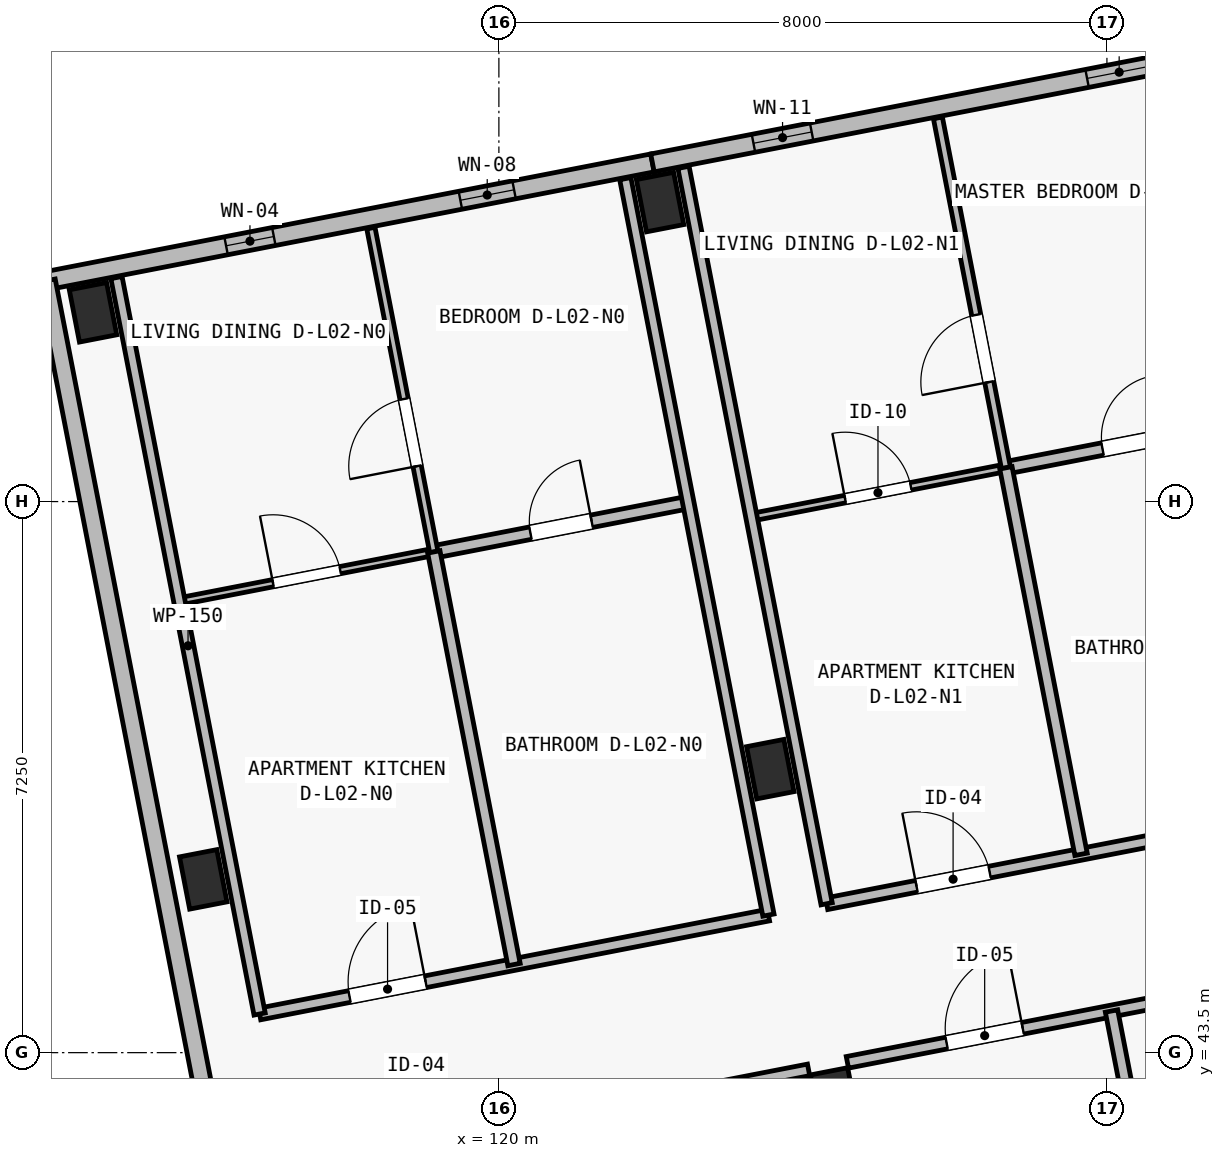
"""IFC4 building model, lengths in metres.
Left out: names, types, materials, properties, quantities, classifications, styles, units other than length and angle.
Written with IfcOpenShell. Run it as: python <this file> out.ifc"""

import sys

from ifc_helpers import new_model, si_unit, direction, frame, frame_2d, origin, origin_2d, place, context, subcontext, project, spatial, rectangle, extrude, element, fill, save


model = new_model("IFC4")
c1 = context("Model", 3, precision=1e-05, world=origin(), true_north=direction((0.0, 1.0)))
c2 = subcontext(c1, "Body", "Model", "MODEL_VIEW")
j1 = project(units=[si_unit("LENGTHUNIT", "METRE"), si_unit("PLANEANGLEUNIT", "RADIAN")], contexts=[c1])
p1 = place(None, origin())
s1 = spatial("IfcSite", under=j1, at=p1, CompositionType="ELEMENT")
p2 = place(p1, origin())
s2 = spatial("IfcBuilding", under=s1, at=p2, CompositionType="ELEMENT")
p3 = place(p2, frame((0.0, 0.0, 8.4)))
s3 = spatial("IfcBuildingStorey", under=s2, at=p3, CompositionType="ELEMENT", Elevation=8.4)
for number, where, z_axis, x_axis in (
    (1, (116.11, 45.78, 0.0), (0.0, 0.0, 1.0), (0.982, 0.191, 0.0)),
    (2, (114.66, 53.24, 0.0), (0.0, 0.0, 1.0), (0.982, 0.191, 0.0)),
    (3, (124.41, 42.91, 0.0), (0.0, 0.0, 1.0), (0.982, 0.191, 0.0)),
    (4, (123.571, 47.23, 0.0), (0.0, 0.0, 1.0), (0.982, 0.191, 0.0)),
    (5, (122.121, 54.69, 0.0), (0.0, 0.0, 1.0), (0.982, 0.191, 0.0)),
):
    element("IfcColumn", number, at=place(p3, frame(where, z_axis=z_axis, x_axis=x_axis)), inside=s3, PredefinedType="COLUMN", context=c2, shape_type="SweptSolid", body=[
        extrude(rectangle(XDim=0.5, YDim=0.7, at=origin_2d()), origin(), (0.0, 0.0, 1.0), 3.25),
    ])
p4 = place(p3, frame((114.045, 53.655, 0.0), z_axis=(0.0, 0.0, 1.0), x_axis=(0.981627273155, 0.190808533872, 0.0)))
e6 = element("IfcWall", 6, at=p4, inside=s3, PredefinedType="SOLIDWALL", context=c2, shape_type="SweptSolid", body=[
    extrude(rectangle(XDim=8.125, YDim=0.24, at=frame_2d((4.062, 0.0))), origin(), (0.0, 0.0, 1.0), 3.0),
])
p5 = place(p4, frame((2.41, 0.0, 0.44)))
e7 = element("IfcOpeningElement", 7, at=p5, cuts=e6, PredefinedType="OPENING", context=c2, shape_type="SweptSolid", body=[
    extrude(rectangle(XDim=0.64, YDim=2.18, at=frame_2d((0.32, 1.09))), frame((0.0, 0.135, 0.0), z_axis=(0.0, -1.0, 0.0), x_axis=(1.0, 0.0, 0.0)), (0.0, 0.0, 1.0), 0.27),
])
p6 = place(p4, frame((5.551, 0.0, 0.5)))
e8 = element("IfcOpeningElement", 8, at=p6, cuts=e6, PredefinedType="OPENING", context=c2, shape_type="SweptSolid", body=[
    extrude(rectangle(XDim=0.72, YDim=2.16, at=frame_2d((0.36, 1.08))), frame((0.0, 0.135, 0.0), z_axis=(0.0, -1.0, 0.0), x_axis=(1.0, 0.0, 0.0)), (0.0, 0.0, 1.0), 0.27),
])
p7 = place(p3, frame((122.02, 55.205, 0.0), z_axis=(0.0, 0.0, 1.0), x_axis=(0.981626422232, 0.190812911449, 0.0)))
e9 = element("IfcWall", 9, at=p7, inside=s3, PredefinedType="SOLIDWALL", context=c2, shape_type="SweptSolid", body=[
    extrude(rectangle(XDim=7.6, YDim=0.24, at=frame_2d((3.8, 0.0))), origin(), (0.0, 0.0, 1.0), 3.0),
])
p8 = place(p7, frame((1.354, 0.0, 0.5)))
e10 = element("IfcOpeningElement", 10, at=p8, cuts=e9, PredefinedType="OPENING", context=c2, shape_type="SweptSolid", body=[
    extrude(rectangle(XDim=0.78, YDim=2.2, at=frame_2d((0.39, 1.1))), frame((0.0, 0.135, 0.0), z_axis=(0.0, -1.0, 0.0), x_axis=(1.0, 0.0, 0.0)), (0.0, 0.0, 1.0), 0.27),
])
p9 = place(p7, frame((5.826, 0.0, 0.44)))
e11 = element("IfcOpeningElement", 11, at=p9, cuts=e9, PredefinedType="OPENING", context=c2, shape_type="SweptSolid", body=[
    extrude(rectangle(XDim=0.86, YDim=2.36, at=frame_2d((0.43, 1.18))), frame((0.0, 0.135, 0.0), z_axis=(0.0, -1.0, 0.0), x_axis=(1.0, 0.0, 0.0)), (0.0, 0.0, 1.0), 0.27),
])
p10 = place(p3, frame((117.985, 33.385, 0.0), z_axis=(0.0, 0.0, 1.0), x_axis=(-0.190808900739, 0.981627201843, 0.0)))
e12 = element("IfcWall", 12, at=p10, inside=s3, PredefinedType="SOLIDWALL", context=c2, shape_type="SweptSolid", body=[
    extrude(rectangle(XDim=20.65, YDim=0.24, at=frame_2d((10.325, 0.0))), origin(), (0.0, 0.0, 1.0), 3.0),
])
p11 = place(p10, frame((2.81, 0.0, 0.45)))
e13 = element("IfcOpeningElement", 13, at=p11, cuts=e12, PredefinedType="OPENING", context=c2, shape_type="SweptSolid", body=[
    extrude(rectangle(XDim=0.62, YDim=2.28, at=frame_2d((0.31, 1.14))), frame((0.0, 0.135, 0.0), z_axis=(0.0, -1.0, 0.0), x_axis=(1.0, 0.0, 0.0)), (0.0, 0.0, 1.0), 0.27),
])
p12 = place(p3, frame((116.482, 41.797, 0.0), z_axis=(0.0, 0.0, 1.0), x_axis=(0.981629678105, 0.190796161028, 0.0)))
e14 = element("IfcWall", 14, at=p12, inside=s3, PredefinedType="PARTITIONING", context=c2, shape_type="SweptSolid", body=[
    extrude(rectangle(XDim=7.735, YDim=0.155, at=frame_2d((3.868, 0.0))), origin(), (0.0, 0.0, 1.0), 2.97),
])
p13 = place(p12, frame((1.985, 0.0, 0.0)))
e15 = element("IfcOpeningElement", 15, at=p13, cuts=e14, PredefinedType="OPENING", context=c2, shape_type="SweptSolid", body=[
    extrude(rectangle(XDim=0.98, YDim=2.15, at=frame_2d((0.49, 1.075))), frame((0.0, 0.093, 0.0), z_axis=(0.0, -1.0, 0.0), x_axis=(1.0, 0.0, 0.0)), (0.0, 0.0, 1.0), 0.185),
])
p14 = place(p3, frame((124.585, 43.372, 0.0), z_axis=(0.0, 0.0, 1.0), x_axis=(0.9816234647, 0.190828125677, 0.0)))
e16 = element("IfcWall", 16, at=p14, inside=s3, PredefinedType="PARTITIONING", context=c2, shape_type="SweptSolid", body=[
    extrude(rectangle(XDim=7.08, YDim=0.155, at=frame_2d((3.54, 0.0))), origin(), (0.0, 0.0, 1.0), 2.97),
])
p15 = place(p14, frame((1.33, 0.0, 0.0)))
e17 = element("IfcOpeningElement", 17, at=p15, cuts=e16, PredefinedType="OPENING", context=c2, shape_type="SweptSolid", body=[
    extrude(rectangle(XDim=1.02, YDim=2.2, at=frame_2d((0.51, 1.1))), frame((0.0, 0.093, 0.0), z_axis=(0.0, -1.0, 0.0), x_axis=(1.0, 0.0, 0.0)), (0.0, 0.0, 1.0), 0.185),
])
p16 = place(p3, frame((128.741, 40.543, 0.0), z_axis=(0.0, 0.0, 1.0), x_axis=(-0.190800102044, 0.981628912095, 0.0)))
e18 = element("IfcWall", 18, at=p16, inside=s3, PredefinedType="PLUMBINGWALL", context=c2, shape_type="SweptSolid", body=[
    extrude(rectangle(XDim=3.57, YDim=0.165, at=frame_2d((1.785, 0.0))), origin(), (0.0, 0.0, 1.0), 2.97),
])
p17 = place(p3, frame((116.852, 44.009, 0.0), z_axis=(0.0, 0.0, 1.0), x_axis=(0.981629173664, 0.190798756314, 0.0)))
e19 = element("IfcWall", 19, at=p17, inside=s3, PredefinedType="PARTITIONING", context=c2, shape_type="SweptSolid", body=[
    extrude(rectangle(XDim=6.82, YDim=0.155, at=frame_2d((3.41, 0.0))), origin(), (0.0, 0.0, 1.0), 2.97),
])
p18 = place(p17, frame((1.205, 0.0, 0.0)))
e20 = element("IfcOpeningElement", 20, at=p18, cuts=e19, PredefinedType="OPENING", context=c2, shape_type="SweptSolid", body=[
    extrude(rectangle(XDim=1.02, YDim=2.2, at=frame_2d((0.51, 1.1))), frame((0.0, 0.093, 0.0), z_axis=(0.0, -1.0, 0.0), x_axis=(1.0, 0.0, 0.0)), (0.0, 0.0, 1.0), 0.185),
])
p19 = place(p3, frame((115.797, 49.437, 0.0), z_axis=(0.0, 0.0, 1.0), x_axis=(0.981615762271, 0.19086774285, 0.0)))
e21 = element("IfcWall", 21, at=p19, inside=s3, PredefinedType="PARTITIONING", context=c2, shape_type="SweptSolid", body=[
    extrude(rectangle(XDim=3.41, YDim=0.095, at=frame_2d((1.705, 0.0))), origin(), (0.0, 0.0, 1.0), 2.97),
])
p20 = place(p19, frame((1.255, 0.0, 0.0)))
e22 = element("IfcOpeningElement", 22, at=p20, cuts=e21, PredefinedType="OPENING", context=c2, shape_type="SweptSolid", body=[
    extrude(rectangle(XDim=0.9, YDim=2.1, at=frame_2d((0.45, 1.05))), frame((0.0, 0.062, 0.0), z_axis=(0.0, -1.0, 0.0), x_axis=(1.0, 0.0, 0.0)), (0.0, 0.0, 1.0), 0.125),
])
p21 = place(p3, frame((119.144, 50.088, 0.0), z_axis=(0.0, 0.0, 1.0), x_axis=(0.981629173664, 0.190798756314, 0.0)))
e23 = element("IfcWall", 23, at=p21, inside=s3, PredefinedType="PLUMBINGWALL", context=c2, shape_type="SweptSolid", body=[
    extrude(rectangle(XDim=3.41, YDim=0.165, at=frame_2d((1.705, 0.0))), origin(), (0.0, 0.0, 1.0), 2.97),
])
p22 = place(p21, frame((1.295, 0.0, 0.0)))
e24 = element("IfcOpeningElement", 24, at=p22, cuts=e23, PredefinedType="OPENING", context=c2, shape_type="SweptSolid", body=[
    extrude(rectangle(XDim=0.82, YDim=2.08, at=frame_2d((0.41, 1.04))), frame((0.0, 0.097, 0.0), z_axis=(0.0, -1.0, 0.0), x_axis=(1.0, 0.0, 0.0)), (0.0, 0.0, 1.0), 0.195),
])
p23 = place(p3, frame((119.144, 50.088, 0.0), z_axis=(0.0, 0.0, 1.0), x_axis=(-0.190812443151, 0.981626513262, 0.0)))
e25 = element("IfcWall", 25, at=p23, inside=s3, PredefinedType="PARTITIONING", context=c2, shape_type="SweptSolid", body=[
    extrude(rectangle(XDim=4.34, YDim=0.11, at=frame_2d((2.17, 0.0))), origin(), (0.0, 0.0, 1.0), 2.97),
])
p24 = place(p23, frame((1.15, 0.0, 0.0)))
e26 = element("IfcOpeningElement", 26, at=p24, cuts=e25, PredefinedType="OPENING", context=c2, shape_type="SweptSolid", body=[
    extrude(rectangle(XDim=0.9, YDim=2.1, at=frame_2d((0.45, 1.05))), frame((0.0, 0.07, 0.0), z_axis=(0.0, -1.0, 0.0), x_axis=(1.0, 0.0, 0.0)), (0.0, 0.0, 1.0), 0.14),
])
p25 = place(p3, frame((120.199, 44.659, 0.0), z_axis=(0.0, 0.0, 1.0), x_axis=(-0.190807031124, 0.981627565258, 0.0)))
e27 = element("IfcWall", 27, at=p25, inside=s3, PredefinedType="PLUMBINGWALL", context=c2, shape_type="SweptSolid", body=[
    extrude(rectangle(XDim=5.53, YDim=0.165, at=frame_2d((2.765, 0.0))), origin(), (0.0, 0.0, 1.0), 2.97),
])
p26 = place(p3, frame((116.852, 44.009, 0.0), z_axis=(0.0, 0.0, 1.0), x_axis=(-0.190814044018, 0.981626202078, 0.0)))
e28 = element("IfcWall", 28, at=p26, inside=s3, PredefinedType="PARTITIONING", context=c2, shape_type="SweptSolid", body=[
    extrude(rectangle(XDim=9.87, YDim=0.15, at=frame_2d((4.935, 0.0))), origin(), (0.0, 0.0, 1.0), 2.97),
])
p27 = place(p3, frame((123.547, 45.31, 0.0), z_axis=(0.0, 0.0, 1.0), x_axis=(-0.190809410863, 0.981627102685, 0.0)))
e29 = element("IfcWall", 29, at=p27, inside=s3, PredefinedType="PARTITIONING", context=c2, shape_type="SweptSolid", body=[
    extrude(rectangle(XDim=9.87, YDim=0.15, at=frame_2d((4.935, 0.0))), origin(), (0.0, 0.0, 1.0), 2.97),
])
p28 = place(p3, frame((124.312, 45.459, 0.0), z_axis=(0.0, 0.0, 1.0), x_axis=(0.981627870431, 0.190805461121, 0.0)))
e30 = element("IfcWall", 30, at=p28, inside=s3, PredefinedType="PARTITIONING", context=c2, shape_type="SweptSolid", body=[
    extrude(rectangle(XDim=6.82, YDim=0.155, at=frame_2d((3.41, 0.0))), origin(), (0.0, 0.0, 1.0), 2.97),
])
p29 = place(p28, frame((1.205, 0.0, 0.0)))
e31 = element("IfcOpeningElement", 31, at=p29, cuts=e30, PredefinedType="OPENING", context=c2, shape_type="SweptSolid", body=[
    extrude(rectangle(XDim=0.98, YDim=2.15, at=frame_2d((0.49, 1.075))), frame((0.0, 0.093, 0.0), z_axis=(0.0, -1.0, 0.0), x_axis=(1.0, 0.0, 0.0)), (0.0, 0.0, 1.0), 0.185),
])
p30 = place(p3, frame((123.324, 50.543, 0.0), z_axis=(0.0, 0.0, 1.0), x_axis=(0.981629173664, 0.190798756314, 0.0)))
e32 = element("IfcWall", 32, at=p30, inside=s3, PredefinedType="PARTITIONING", context=c2, shape_type="SweptSolid", body=[
    extrude(rectangle(XDim=3.41, YDim=0.1, at=frame_2d((1.705, 0.0))), origin(), (0.0, 0.0, 1.0), 2.97),
])
p31 = place(p30, frame((1.255, 0.0, 0.0)))
e33 = element("IfcOpeningElement", 33, at=p31, cuts=e32, PredefinedType="OPENING", context=c2, shape_type="SweptSolid", body=[
    extrude(rectangle(XDim=0.88, YDim=2.1, at=frame_2d((0.44, 1.05))), frame((0.0, 0.065, 0.0), z_axis=(0.0, -1.0, 0.0), x_axis=(1.0, 0.0, 0.0)), (0.0, 0.0, 1.0), 0.13),
])
p32 = place(p3, frame((126.671, 51.194, 0.0), z_axis=(0.0, 0.0, 1.0), x_axis=(0.981629173664, 0.190798756314, 0.0)))
e34 = element("IfcWall", 34, at=p32, inside=s3, PredefinedType="PLUMBINGWALL", context=c2, shape_type="SweptSolid", body=[
    extrude(rectangle(XDim=3.41, YDim=0.165, at=frame_2d((1.705, 0.0))), origin(), (0.0, 0.0, 1.0), 2.97),
])
p33 = place(p32, frame((1.295, 0.0, 0.0)))
e35 = element("IfcOpeningElement", 35, at=p33, cuts=e34, PredefinedType="OPENING", context=c2, shape_type="SweptSolid", body=[
    extrude(rectangle(XDim=0.82, YDim=2.08, at=frame_2d((0.41, 1.04))), frame((0.0, 0.097, 0.0), z_axis=(0.0, -1.0, 0.0), x_axis=(1.0, 0.0, 0.0)), (0.0, 0.0, 1.0), 0.195),
])
p34 = place(p3, frame((126.671, 51.194, 0.0), z_axis=(0.0, 0.0, 1.0), x_axis=(-0.190787451574, 0.981631370893, 0.0)))
e36 = element("IfcWall", 36, at=p34, inside=s3, PredefinedType="PARTITIONING", context=c2, shape_type="SweptSolid", body=[
    extrude(rectangle(XDim=4.69, YDim=0.12, at=frame_2d((2.345, 0.0))), origin(), (0.0, 0.0, 1.0), 2.97),
])
p35 = place(p34, frame((1.15, 0.0, 0.0)))
e37 = element("IfcOpeningElement", 37, at=p35, cuts=e36, PredefinedType="OPENING", context=c2, shape_type="SweptSolid", body=[
    extrude(rectangle(XDim=0.9, YDim=2.1, at=frame_2d((0.45, 1.05))), frame((0.0, 0.075, 0.0), z_axis=(0.0, -1.0, 0.0), x_axis=(1.0, 0.0, 0.0)), (0.0, 0.0, 1.0), 0.15),
])
p36 = place(p3, frame((127.66, 46.109, 0.0), z_axis=(0.0, 0.0, 1.0), x_axis=(-0.190838120755, 0.981621521599, 0.0)))
e38 = element("IfcWall", 38, at=p36, inside=s3, PredefinedType="PLUMBINGWALL", context=c2, shape_type="SweptSolid", body=[
    extrude(rectangle(XDim=5.18, YDim=0.165, at=frame_2d((2.59, 0.0))), origin(), (0.0, 0.0, 1.0), 2.97),
])
p37 = place(p3, frame((124.312, 45.459, 0.0), z_axis=(0.0, 0.0, 1.0), x_axis=(-0.190814044018, 0.981626202078, 0.0)))
e39 = element("IfcWall", 39, at=p37, inside=s3, PredefinedType="PARTITIONING", context=c2, shape_type="SweptSolid", body=[
    extrude(rectangle(XDim=9.87, YDim=0.15, at=frame_2d((4.935, 0.0))), origin(), (0.0, 0.0, 1.0), 2.97),
])
p38 = place(p5, origin())
e40 = element("IfcWindow", 40, at=p38, inside=s3, PartitioningType="SINGLE_PANEL", PredefinedType="WINDOW", context=c2, shape_type="SweptSolid", body=[
    extrude(rectangle(XDim=0.64, YDim=2.18, at=frame_2d((0.32, 1.09))), frame((0.0, 0.03, 0.0), z_axis=(0.0, -1.0, 0.0), x_axis=(1.0, 0.0, 0.0)), (0.0, 0.0, 1.0), 0.06),
])
fill(e7, e40)
p39 = place(p6, origin())
e41 = element("IfcWindow", 41, at=p39, inside=s3, PartitioningType="SINGLE_PANEL", PredefinedType="WINDOW", context=c2, shape_type="SweptSolid", body=[
    extrude(rectangle(XDim=0.72, YDim=2.16, at=frame_2d((0.36, 1.08))), frame((0.0, 0.03, 0.0), z_axis=(0.0, -1.0, 0.0), x_axis=(1.0, 0.0, 0.0)), (0.0, 0.0, 1.0), 0.06),
])
fill(e8, e41)
p40 = place(p8, origin())
e42 = element("IfcWindow", 42, at=p40, inside=s3, PartitioningType="SINGLE_PANEL", PredefinedType="WINDOW", context=c2, shape_type="SweptSolid", body=[
    extrude(rectangle(XDim=0.78, YDim=2.2, at=frame_2d((0.39, 1.1))), frame((0.0, 0.03, 0.0), z_axis=(0.0, -1.0, 0.0), x_axis=(1.0, 0.0, 0.0)), (0.0, 0.0, 1.0), 0.06),
])
fill(e10, e42)
p41 = place(p9, origin())
e43 = element("IfcWindow", 43, at=p41, inside=s3, PartitioningType="SINGLE_PANEL", PredefinedType="WINDOW", context=c2, shape_type="SweptSolid", body=[
    extrude(rectangle(XDim=0.86, YDim=2.36, at=frame_2d((0.43, 1.18))), frame((0.0, 0.03, 0.0), z_axis=(0.0, -1.0, 0.0), x_axis=(1.0, 0.0, 0.0)), (0.0, 0.0, 1.0), 0.06),
])
fill(e11, e43)
p42 = place(p15, origin())
e44 = element("IfcDoor", 44, at=p42, inside=s3, OperationType="SINGLE_SWING_RIGHT", PredefinedType="DOOR", context=c2, shape_type="SweptSolid", body=[
    extrude(rectangle(XDim=1.02, YDim=2.2, at=frame_2d((0.51, 1.1))), frame((0.0, 0.025, 0.0), z_axis=(0.0, -1.0, 0.0), x_axis=(1.0, 0.0, 0.0)), (0.0, 0.0, 1.0), 0.05),
])
fill(e17, e44)
p43 = place(p18, origin())
e45 = element("IfcDoor", 45, at=p43, inside=s3, OperationType="SINGLE_SWING_RIGHT", PredefinedType="DOOR", context=c2, shape_type="SweptSolid", body=[
    extrude(rectangle(XDim=1.02, YDim=2.2, at=frame_2d((0.51, 1.1))), frame((0.0, 0.025, 0.0), z_axis=(0.0, -1.0, 0.0), x_axis=(1.0, 0.0, 0.0)), (0.0, 0.0, 1.0), 0.05),
])
fill(e20, e45)
p44 = place(p20, origin())
e46 = element("IfcDoor", 46, at=p44, inside=s3, OperationType="SINGLE_SWING_LEFT", PredefinedType="DOOR", context=c2, shape_type="SweptSolid", body=[
    extrude(rectangle(XDim=0.9, YDim=2.1, at=frame_2d((0.45, 1.05))), frame((0.0, 0.025, 0.0), z_axis=(0.0, -1.0, 0.0), x_axis=(1.0, 0.0, 0.0)), (0.0, 0.0, 1.0), 0.05),
])
fill(e22, e46)
p45 = place(p22, origin())
e47 = element("IfcDoor", 47, at=p45, inside=s3, OperationType="SINGLE_SWING_RIGHT", PredefinedType="DOOR", context=c2, shape_type="SweptSolid", body=[
    extrude(rectangle(XDim=0.82, YDim=2.08, at=frame_2d((0.41, 1.04))), frame((0.0, 0.025, 0.0), z_axis=(0.0, -1.0, 0.0), x_axis=(1.0, 0.0, 0.0)), (0.0, 0.0, 1.0), 0.05),
])
fill(e24, e47)
p46 = place(p24, origin())
e48 = element("IfcDoor", 48, at=p46, inside=s3, OperationType="SINGLE_SWING_LEFT", PredefinedType="DOOR", context=c2, shape_type="SweptSolid", body=[
    extrude(rectangle(XDim=0.9, YDim=2.1, at=frame_2d((0.45, 1.05))), frame((0.0, 0.025, 0.0), z_axis=(0.0, -1.0, 0.0), x_axis=(1.0, 0.0, 0.0)), (0.0, 0.0, 1.0), 0.05),
])
fill(e26, e48)
p47 = place(p29, origin())
e49 = element("IfcDoor", 49, at=p47, inside=s3, OperationType="SINGLE_SWING_LEFT", PredefinedType="DOOR", context=c2, shape_type="SweptSolid", body=[
    extrude(rectangle(XDim=0.98, YDim=2.15, at=frame_2d((0.49, 1.075))), frame((0.0, 0.025, 0.0), z_axis=(0.0, -1.0, 0.0), x_axis=(1.0, 0.0, 0.0)), (0.0, 0.0, 1.0), 0.05),
])
fill(e31, e49)
p48 = place(p31, origin())
e50 = element("IfcDoor", 50, at=p48, inside=s3, OperationType="SINGLE_SWING_LEFT", PredefinedType="DOOR", context=c2, shape_type="SweptSolid", body=[
    extrude(rectangle(XDim=0.88, YDim=2.1, at=frame_2d((0.44, 1.05))), frame((0.0, 0.025, 0.0), z_axis=(0.0, -1.0, 0.0), x_axis=(1.0, 0.0, 0.0)), (0.0, 0.0, 1.0), 0.05),
])
fill(e33, e50)
p49 = place(p33, origin())
e51 = element("IfcDoor", 51, at=p49, inside=s3, OperationType="SINGLE_SWING_RIGHT", PredefinedType="DOOR", context=c2, shape_type="SweptSolid", body=[
    extrude(rectangle(XDim=0.82, YDim=2.08, at=frame_2d((0.41, 1.04))), frame((0.0, 0.025, 0.0), z_axis=(0.0, -1.0, 0.0), x_axis=(1.0, 0.0, 0.0)), (0.0, 0.0, 1.0), 0.05),
])
fill(e35, e51)
p50 = place(p35, origin())
e52 = element("IfcDoor", 52, at=p50, inside=s3, OperationType="SINGLE_SWING_LEFT", PredefinedType="DOOR", context=c2, shape_type="SweptSolid", body=[
    extrude(rectangle(XDim=0.9, YDim=2.1, at=frame_2d((0.45, 1.05))), frame((0.0, 0.025, 0.0), z_axis=(0.0, -1.0, 0.0), x_axis=(1.0, 0.0, 0.0)), (0.0, 0.0, 1.0), 0.05),
])
fill(e37, e52)
save(model, sys.argv[1])
